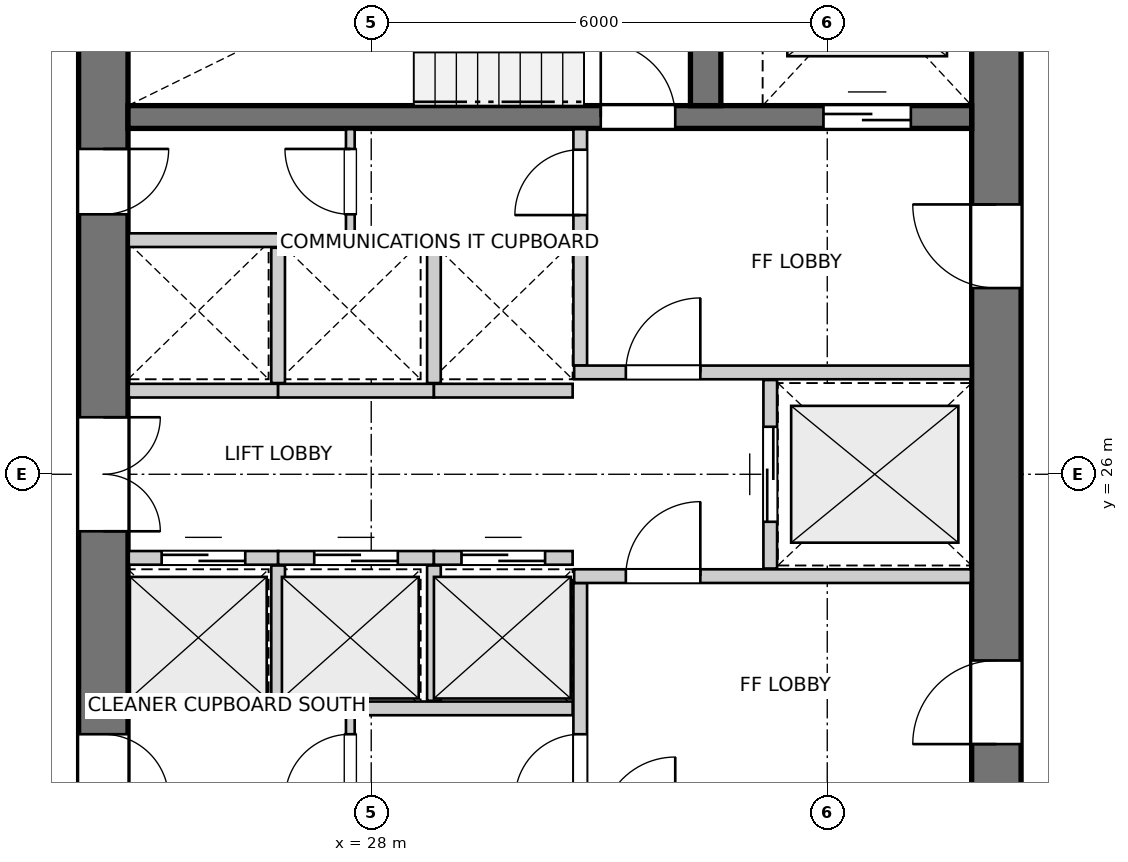
"""IFC4 building model, lengths in metres.
Left out: names, types, materials, properties, quantities, classifications, styles, units other than length and angle.
Written with IfcOpenShell. Run it as: python <this file> out.ifc"""

import sys

from ifc_helpers import new_model, si_unit, direction, frame, frame_2d, origin, place, context, subcontext, project, spatial, rectangle, extrude, source, transform, mapped, element, fill, save


model = new_model("IFC4")
c1 = context("Model", 3, precision=1e-05, world=origin(), true_north=direction((0.0, 1.0)))
c2 = subcontext(c1, "Body", "Model", "MODEL_VIEW")
j1 = project(units=[si_unit("LENGTHUNIT", "METRE"), si_unit("PLANEANGLEUNIT", "RADIAN")], contexts=[c1])
p1 = place(None, origin())
s1 = spatial("IfcSite", under=j1, at=p1, CompositionType="ELEMENT")
p2 = place(p1, origin())
s2 = spatial("IfcBuilding", under=s1, at=p2, CompositionType="ELEMENT")
p3 = place(p2, frame((0.0, 0.0, 108.8)))
s3 = spatial("IfcBuildingStorey", under=s2, at=p3, CompositionType="ELEMENT", Elevation=108.8)
p4 = place(p3, frame((24.475, 33.8, 0.0), z_axis=(0.0, 0.0, 1.0), x_axis=(0.0, -1.0, 0.0)))
e1 = element("IfcWall", 1, at=p4, inside=s3, PredefinedType="SHEAR", context=c2, shape_type="SweptSolid", body=[
    extrude(rectangle(XDim=15.6, YDim=0.65, at=frame_2d((7.8, 0.0))), origin(), (0.0, 0.0, 1.0), 2.935),
])
p5 = place(p4, frame((7.05, 0.0, 0.0)))
e2 = element("IfcOpeningElement", 2, at=p5, cuts=e1, PredefinedType="OPENING", context=c2, shape_type="SweptSolid", body=[
    extrude(rectangle(XDim=1.5, YDim=2.15, at=frame_2d((0.75, 1.075))), frame((0.0, 0.335, 0.0), z_axis=(0.0, -1.0, 0.0), x_axis=(1.0, 0.0, 0.0)), (0.0, 0.0, 1.0), 0.67),
])
p6 = place(p4, frame((3.52, 0.0, 0.0)))
e3 = element("IfcOpeningElement", 3, at=p6, cuts=e1, PredefinedType="OPENING", context=c2, shape_type="SweptSolid", body=[
    extrude(rectangle(XDim=0.86, YDim=2.05, at=frame_2d((0.43, 1.025))), frame((0.0, 0.335, 0.0), z_axis=(0.0, -1.0, 0.0), x_axis=(1.0, 0.0, 0.0)), (0.0, 0.0, 1.0), 0.67),
])
p7 = place(p4, frame((11.22, 0.0, 0.0)))
e4 = element("IfcOpeningElement", 4, at=p7, cuts=e1, PredefinedType="OPENING", context=c2, shape_type="SweptSolid", body=[
    extrude(rectangle(XDim=0.86, YDim=2.05, at=frame_2d((0.43, 1.025))), frame((0.0, 0.335, 0.0), z_axis=(0.0, -1.0, 0.0), x_axis=(1.0, 0.0, 0.0)), (0.0, 0.0, 1.0), 0.67),
])
p8 = place(p3, frame((36.225, 18.2, 0.0), z_axis=(0.0, 0.0, 1.0), x_axis=(0.0, 1.0, 0.0)))
e5 = element("IfcWall", 5, at=p8, inside=s3, PredefinedType="SHEAR", context=c2, shape_type="SweptSolid", body=[
    extrude(rectangle(XDim=15.6, YDim=0.65, at=frame_2d((7.8, 0.0))), origin(), (0.0, 0.0, 1.0), 2.935),
])
p9 = place(p8, frame((4.25, 0.0, 0.0)))
e6 = element("IfcOpeningElement", 6, at=p9, cuts=e5, PredefinedType="OPENING", context=c2, shape_type="SweptSolid", body=[
    extrude(rectangle(XDim=1.1, YDim=2.15, at=frame_2d((0.55, 1.075))), frame((0.0, 0.335, 0.0), z_axis=(0.0, -1.0, 0.0), x_axis=(1.0, 0.0, 0.0)), (0.0, 0.0, 1.0), 0.67),
])
p10 = place(p8, frame((10.25, 0.0, 0.0)))
e7 = element("IfcOpeningElement", 7, at=p10, cuts=e5, PredefinedType="OPENING", context=c2, shape_type="SweptSolid", body=[
    extrude(rectangle(XDim=1.1, YDim=2.15, at=frame_2d((0.55, 1.075))), frame((0.0, 0.335, 0.0), z_axis=(0.0, -1.0, 0.0), x_axis=(1.0, 0.0, 0.0)), (0.0, 0.0, 1.0), 0.67),
])
p11 = place(p3, frame((24.8, 30.7, 0.0), z_axis=(0.0, 0.0, 1.0), x_axis=(1.0, 0.0, 0.0)))
e8 = element("IfcWall", 8, at=p11, inside=s3, PredefinedType="SHEAR", context=c2, shape_type="SweptSolid", body=[
    extrude(rectangle(XDim=11.1, YDim=0.3, at=frame_2d((5.55, 0.0))), origin(), (0.0, 0.0, 1.0), 2.935),
])
p12 = place(p11, frame((6.22, 0.0, 0.0)))
e9 = element("IfcOpeningElement", 9, at=p12, cuts=e8, PredefinedType="OPENING", context=c2, shape_type="SweptSolid", body=[
    extrude(rectangle(XDim=0.98, YDim=2.15, at=frame_2d((0.49, 1.075))), frame((0.0, 0.16, 0.0), z_axis=(0.0, -1.0, 0.0), x_axis=(1.0, 0.0, 0.0)), (0.0, 0.0, 1.0), 0.32),
])
p13 = place(p11, frame((9.15, 0.0, 0.0)))
e10 = element("IfcOpeningElement", 10, at=p13, cuts=e8, PredefinedType="OPENING", context=c2, shape_type="SweptSolid", body=[
    extrude(rectangle(XDim=1.15, YDim=2.15, at=frame_2d((0.575, 1.075))), frame((0.0, 0.16, 0.0), z_axis=(0.0, -1.0, 0.0), x_axis=(1.0, 0.0, 0.0)), (0.0, 0.0, 1.0), 0.32),
])
p14 = place(p3, frame((32.4, 30.85, 0.0), z_axis=(0.0, 0.0, 1.0), x_axis=(0.0, 1.0, 0.0)))
e11 = element("IfcWall", 11, at=p14, inside=s3, PredefinedType="SHEAR", context=c2, shape_type="SweptSolid", body=[
    extrude(rectangle(XDim=2.95, YDim=0.4, at=frame_2d((1.475, 0.0))), origin(), (0.0, 0.0, 1.0), 2.935),
])
p15 = place(p3, frame((30.75, 21.46, 0.0), z_axis=(0.0, 0.0, 1.0), x_axis=(0.0, 1.0, 0.0)))
e12 = element("IfcWall", 12, at=p15, inside=s3, PredefinedType="PARTITIONING", context=c2, shape_type="SweptSolid", body=[
    extrude(rectangle(XDim=3.11, YDim=0.18, at=frame_2d((1.555, 0.0))), origin(), (0.0, 0.0, 1.0), 2.935),
])
p16 = place(p15, frame((0.26, 0.0, 0.0)))
e13 = element("IfcOpeningElement", 13, at=p16, cuts=e12, PredefinedType="OPENING", context=c2, shape_type="SweptSolid", body=[
    extrude(rectangle(XDim=0.86, YDim=2.05, at=frame_2d((0.43, 1.025))), frame((0.0, 0.1, 0.0), z_axis=(0.0, -1.0, 0.0), x_axis=(1.0, 0.0, 0.0)), (0.0, 0.0, 1.0), 0.2),
])
p17 = place(p3, frame((30.67, 24.66, 0.0), z_axis=(0.0, 0.0, 1.0), x_axis=(1.0, 0.0, 0.0)))
e14 = element("IfcWall", 14, at=p17, inside=s3, PredefinedType="PARTITIONING", context=c2, shape_type="SweptSolid", body=[
    extrude(rectangle(XDim=5.22, YDim=0.18, at=frame_2d((2.61, 0.0))), origin(), (0.0, 0.0, 1.0), 2.935),
])
p18 = place(p17, frame((0.68, 0.0, 0.0)))
e15 = element("IfcOpeningElement", 15, at=p18, cuts=e14, PredefinedType="OPENING", context=c2, shape_type="SweptSolid", body=[
    extrude(rectangle(XDim=0.98, YDim=2.15, at=frame_2d((0.49, 1.075))), frame((0.0, 0.1, 0.0), z_axis=(0.0, -1.0, 0.0), x_axis=(1.0, 0.0, 0.0)), (0.0, 0.0, 1.0), 0.2),
])
p19 = place(p3, frame((30.75, 27.43, 0.0), z_axis=(0.0, 0.0, 1.0), x_axis=(0.0, 1.0, 0.0)))
e16 = element("IfcWall", 16, at=p19, inside=s3, PredefinedType="PARTITIONING", context=c2, shape_type="SweptSolid", body=[
    extrude(rectangle(XDim=3.11, YDim=0.18, at=frame_2d((1.555, 0.0))), origin(), (0.0, 0.0, 1.0), 2.935),
])
p20 = place(p19, frame((1.98, 0.0, 0.0)))
e17 = element("IfcOpeningElement", 17, at=p20, cuts=e16, PredefinedType="OPENING", context=c2, shape_type="SweptSolid", body=[
    extrude(rectangle(XDim=0.86, YDim=2.05, at=frame_2d((0.43, 1.025))), frame((0.0, 0.1, 0.0), z_axis=(0.0, -1.0, 0.0), x_axis=(1.0, 0.0, 0.0)), (0.0, 0.0, 1.0), 0.2),
])
p21 = place(p3, frame((30.67, 27.34, 0.0), z_axis=(0.0, 0.0, 1.0), x_axis=(1.0, 0.0, 0.0)))
e18 = element("IfcWall", 18, at=p21, inside=s3, PredefinedType="PARTITIONING", context=c2, shape_type="SweptSolid", body=[
    extrude(rectangle(XDim=5.22, YDim=0.18, at=frame_2d((2.61, 0.0))), origin(), (0.0, 0.0, 1.0), 2.935),
])
p22 = place(p21, frame((0.68, 0.0, 0.0)))
e19 = element("IfcOpeningElement", 19, at=p22, cuts=e18, PredefinedType="OPENING", context=c2, shape_type="SweptSolid", body=[
    extrude(rectangle(XDim=0.98, YDim=2.15, at=frame_2d((0.49, 1.075))), frame((0.0, 0.1, 0.0), z_axis=(0.0, -1.0, 0.0), x_axis=(1.0, 0.0, 0.0)), (0.0, 0.0, 1.0), 0.2),
])
p23 = place(p3, frame((33.25, 24.76, 0.0), z_axis=(0.0, 0.0, 1.0), x_axis=(0.0, 1.0, 0.0)))
e20 = element("IfcWall", 20, at=p23, inside=s3, PredefinedType="PARTITIONING", context=c2, shape_type="SweptSolid", body=[
    extrude(rectangle(XDim=2.48, YDim=0.18, at=frame_2d((1.24, 0.0))), origin(), (0.0, 0.0, 1.0), 2.935),
])
p24 = place(p23, frame((0.615, 0.0, 0.0)))
e21 = element("IfcOpeningElement", 21, at=p24, cuts=e20, PredefinedType="OPENING", context=c2, shape_type="SweptSolid", body=[
    extrude(rectangle(XDim=1.25, YDim=2.15, at=frame_2d((0.625, 1.075))), frame((0.0, 0.1, 0.0), z_axis=(0.0, -1.0, 0.0), x_axis=(1.0, 0.0, 0.0)), (0.0, 0.0, 1.0), 0.2),
])
p25 = place(p3, frame((24.81, 22.92, 0.0), z_axis=(0.0, 0.0, 1.0), x_axis=(1.0, 0.0, 0.0)))
e22 = element("IfcWall", 22, at=p25, inside=s3, PredefinedType="PARTITIONING", context=c2, shape_type="SweptSolid", body=[
    extrude(rectangle(XDim=5.84, YDim=0.18, at=frame_2d((2.92, 0.0))), origin(), (0.0, 0.0, 1.0), 2.935),
])
p26 = place(p3, frame((24.81, 24.9, 0.0), z_axis=(0.0, 0.0, 1.0), x_axis=(1.0, 0.0, 0.0)))
e23 = element("IfcWall", 23, at=p26, inside=s3, PredefinedType="PARTITIONING", context=c2, shape_type="SweptSolid", body=[
    extrude(rectangle(XDim=1.965, YDim=0.18, at=frame_2d((0.982, 0.0))), origin(), (0.0, 0.0, 1.0), 2.935),
])
p27 = place(p26, frame((0.433, 0.0, 0.0)))
e24 = element("IfcOpeningElement", 24, at=p27, cuts=e23, PredefinedType="OPENING", context=c2, shape_type="SweptSolid", body=[
    extrude(rectangle(XDim=1.1, YDim=2.15, at=frame_2d((0.55, 1.075))), frame((0.0, 0.1, 0.0), z_axis=(0.0, -1.0, 0.0), x_axis=(1.0, 0.0, 0.0)), (0.0, 0.0, 1.0), 0.2),
])
p28 = place(p3, frame((26.775, 24.9, 0.0), z_axis=(0.0, 0.0, 1.0), x_axis=(1.0, 0.0, 0.0)))
e25 = element("IfcWall", 25, at=p28, inside=s3, PredefinedType="PARTITIONING", context=c2, shape_type="SweptSolid", body=[
    extrude(rectangle(XDim=2.05, YDim=0.18, at=frame_2d((1.025, 0.0))), origin(), (0.0, 0.0, 1.0), 2.935),
])
p29 = place(p28, frame((0.475, 0.0, 0.0)))
e26 = element("IfcOpeningElement", 26, at=p29, cuts=e25, PredefinedType="OPENING", context=c2, shape_type="SweptSolid", body=[
    extrude(rectangle(XDim=1.1, YDim=2.15, at=frame_2d((0.55, 1.075))), frame((0.0, 0.1, 0.0), z_axis=(0.0, -1.0, 0.0), x_axis=(1.0, 0.0, 0.0)), (0.0, 0.0, 1.0), 0.2),
])
p30 = place(p3, frame((26.775, 23.02, 0.0), z_axis=(0.0, 0.0, 1.0), x_axis=(0.0, 1.0, 0.0)))
e27 = element("IfcWall", 27, at=p30, inside=s3, PredefinedType="PARTITIONING", context=c2, shape_type="SweptSolid", body=[
    extrude(rectangle(XDim=1.78, YDim=0.18, at=frame_2d((0.89, 0.0))), origin(), (0.0, 0.0, 1.0), 2.935),
])
p31 = place(p3, frame((28.825, 24.9, 0.0), z_axis=(0.0, 0.0, 1.0), x_axis=(1.0, 0.0, 0.0)))
e28 = element("IfcWall", 28, at=p31, inside=s3, PredefinedType="PARTITIONING", context=c2, shape_type="SweptSolid", body=[
    extrude(rectangle(XDim=1.825, YDim=0.18, at=frame_2d((0.913, 0.0))), origin(), (0.0, 0.0, 1.0), 2.935),
])
p32 = place(p31, frame((0.363, 0.0, 0.0)))
e29 = element("IfcOpeningElement", 29, at=p32, cuts=e28, PredefinedType="OPENING", context=c2, shape_type="SweptSolid", body=[
    extrude(rectangle(XDim=1.1, YDim=2.15, at=frame_2d((0.55, 1.075))), frame((0.0, 0.1, 0.0), z_axis=(0.0, -1.0, 0.0), x_axis=(1.0, 0.0, 0.0)), (0.0, 0.0, 1.0), 0.2),
])
p33 = place(p3, frame((28.825, 23.02, 0.0), z_axis=(0.0, 0.0, 1.0), x_axis=(0.0, 1.0, 0.0)))
e30 = element("IfcWall", 30, at=p33, inside=s3, PredefinedType="PARTITIONING", context=c2, shape_type="SweptSolid", body=[
    extrude(rectangle(XDim=1.78, YDim=0.18, at=frame_2d((0.89, 0.0))), origin(), (0.0, 0.0, 1.0), 2.935),
])
p34 = place(p3, frame((24.81, 29.08, 0.0), z_axis=(0.0, 0.0, 1.0), x_axis=(1.0, 0.0, 0.0)))
e31 = element("IfcWall", 31, at=p34, inside=s3, PredefinedType="PARTITIONING", context=c2, shape_type="SweptSolid", body=[
    extrude(rectangle(XDim=5.84, YDim=0.18, at=frame_2d((2.92, 0.0))), origin(), (0.0, 0.0, 1.0), 2.935),
])
p35 = place(p3, frame((24.81, 27.1, 0.0), z_axis=(0.0, 0.0, 1.0), x_axis=(1.0, 0.0, 0.0)))
e32 = element("IfcWall", 32, at=p35, inside=s3, PredefinedType="PARTITIONING", context=c2, shape_type="SweptSolid", body=[
    extrude(rectangle(XDim=1.965, YDim=0.18, at=frame_2d((0.982, 0.0))), origin(), (0.0, 0.0, 1.0), 2.935),
])
p36 = place(p3, frame((26.775, 27.1, 0.0), z_axis=(0.0, 0.0, 1.0), x_axis=(1.0, 0.0, 0.0)))
e33 = element("IfcWall", 33, at=p36, inside=s3, PredefinedType="PARTITIONING", context=c2, shape_type="SweptSolid", body=[
    extrude(rectangle(XDim=2.05, YDim=0.18, at=frame_2d((1.025, 0.0))), origin(), (0.0, 0.0, 1.0), 2.935),
])
p37 = place(p3, frame((26.775, 27.2, 0.0), z_axis=(0.0, 0.0, 1.0), x_axis=(0.0, 1.0, 0.0)))
e34 = element("IfcWall", 34, at=p37, inside=s3, PredefinedType="PARTITIONING", context=c2, shape_type="SweptSolid", body=[
    extrude(rectangle(XDim=1.78, YDim=0.18, at=frame_2d((0.89, 0.0))), origin(), (0.0, 0.0, 1.0), 2.935),
])
p38 = place(p3, frame((28.825, 27.1, 0.0), z_axis=(0.0, 0.0, 1.0), x_axis=(1.0, 0.0, 0.0)))
e35 = element("IfcWall", 35, at=p38, inside=s3, PredefinedType="PARTITIONING", context=c2, shape_type="SweptSolid", body=[
    extrude(rectangle(XDim=1.825, YDim=0.18, at=frame_2d((0.913, 0.0))), origin(), (0.0, 0.0, 1.0), 2.935),
])
p39 = place(p3, frame((28.825, 27.2, 0.0), z_axis=(0.0, 0.0, 1.0), x_axis=(0.0, 1.0, 0.0)))
e36 = element("IfcWall", 36, at=p39, inside=s3, PredefinedType="PARTITIONING", context=c2, shape_type="SweptSolid", body=[
    extrude(rectangle(XDim=1.78, YDim=0.18, at=frame_2d((0.89, 0.0))), origin(), (0.0, 0.0, 1.0), 2.935),
])
p40 = place(p3, frame((27.725, 21.46, 0.0), z_axis=(0.0, 0.0, 1.0), x_axis=(0.0, 1.0, 0.0)))
e37 = element("IfcWall", 37, at=p40, inside=s3, PredefinedType="PARTITIONING", context=c2, shape_type="SweptSolid", body=[
    extrude(rectangle(XDim=1.38, YDim=0.115, at=frame_2d((0.69, 0.0))), origin(), (0.0, 0.0, 1.0), 2.935),
])
p41 = place(p40, frame((0.26, 0.0, 0.0)))
e38 = element("IfcOpeningElement", 38, at=p41, cuts=e37, PredefinedType="OPENING", context=c2, shape_type="SweptSolid", body=[
    extrude(rectangle(XDim=0.86, YDim=2.05, at=frame_2d((0.43, 1.025))), frame((0.0, 0.067, 0.0), z_axis=(0.0, -1.0, 0.0), x_axis=(1.0, 0.0, 0.0)), (0.0, 0.0, 1.0), 0.135),
])
p42 = place(p3, frame((27.725, 29.16, 0.0), z_axis=(0.0, 0.0, 1.0), x_axis=(0.0, 1.0, 0.0)))
e39 = element("IfcWall", 39, at=p42, inside=s3, PredefinedType="PARTITIONING", context=c2, shape_type="SweptSolid", body=[
    extrude(rectangle(XDim=1.38, YDim=0.115, at=frame_2d((0.69, 0.0))), origin(), (0.0, 0.0, 1.0), 2.935),
])
p43 = place(p42, frame((0.26, 0.0, 0.0)))
e40 = element("IfcOpeningElement", 40, at=p43, cuts=e39, PredefinedType="OPENING", context=c2, shape_type="SweptSolid", body=[
    extrude(rectangle(XDim=0.86, YDim=2.05, at=frame_2d((0.43, 1.025))), frame((0.0, 0.067, 0.0), z_axis=(0.0, -1.0, 0.0), x_axis=(1.0, 0.0, 0.0)), (0.0, 0.0, 1.0), 0.135),
])
m1 = source(origin(), c2, "Body", "SweptSolid", [
    extrude(rectangle(XDim=0.98, YDim=2.15, at=frame_2d((0.49, 1.075))), frame((0.0, 0.025, 0.0), z_axis=(0.0, -1.0, 0.0), x_axis=(1.0, 0.0, 0.0)), (0.0, 0.0, 1.0), 0.05),
])
p44 = place(p12, origin())
e41 = element("IfcDoor", 41, at=p44, inside=s3, OperationType="SINGLE_SWING_LEFT", PredefinedType="DOOR", context=c2, shape_type="MappedRepresentation", body=[
    mapped(m1, transform((0.0, 0.0, 0.0), x_axis=(1.0, 0.0, 0.0), y_axis=(0.0, 1.0, 0.0), z_axis=(0.0, 0.0, 1.0), scale=1.0)),
])
fill(e9, e41)
m2 = source(origin(), c2, "Body", "SweptSolid", [
    extrude(rectangle(XDim=1.15, YDim=2.15, at=frame_2d((0.575, 1.075))), frame((0.0, 0.025, 0.0), z_axis=(0.0, -1.0, 0.0), x_axis=(1.0, 0.0, 0.0)), (0.0, 0.0, 1.0), 0.05),
])
p45 = place(p13, origin())
e42 = element("IfcDoor", 42, at=p45, inside=s3, OperationType="DOUBLE_DOOR_SLIDING", PredefinedType="DOOR", context=c2, shape_type="MappedRepresentation", body=[
    mapped(m2, transform((0.0, 0.0, 0.0), x_axis=(1.0, 0.0, 0.0), y_axis=(0.0, 1.0, 0.0), z_axis=(0.0, 0.0, 1.0), scale=1.0)),
])
fill(e10, e42)
m3 = source(origin(), c2, "Body", "SweptSolid", [
    extrude(rectangle(XDim=1.1, YDim=2.15, at=frame_2d((0.55, 1.075))), frame((0.0, 0.025, 0.0), z_axis=(0.0, -1.0, 0.0), x_axis=(1.0, 0.0, 0.0)), (0.0, 0.0, 1.0), 0.05),
])
p46 = place(p9, origin())
e43 = element("IfcDoor", 43, at=p46, inside=s3, OperationType="SINGLE_SWING_LEFT", PredefinedType="DOOR", context=c2, shape_type="MappedRepresentation", body=[
    mapped(m3, transform((0.0, 0.0, 0.0), x_axis=(1.0, 0.0, 0.0), y_axis=(0.0, 1.0, 0.0), z_axis=(0.0, 0.0, 1.0), scale=1.0)),
])
fill(e6, e43)
p47 = place(p10, origin())
e44 = element("IfcDoor", 44, at=p47, inside=s3, OperationType="SINGLE_SWING_RIGHT", PredefinedType="DOOR", context=c2, shape_type="MappedRepresentation", body=[
    mapped(m3, transform((0.0, 0.0, 0.0), x_axis=(1.0, 0.0, 0.0), y_axis=(0.0, 1.0, 0.0), z_axis=(0.0, 0.0, 1.0), scale=1.0)),
])
fill(e7, e44)
m4 = source(origin(), c2, "Body", "SweptSolid", [
    extrude(rectangle(XDim=1.5, YDim=2.15, at=frame_2d((0.75, 1.075))), frame((0.0, 0.025, 0.0), z_axis=(0.0, -1.0, 0.0), x_axis=(1.0, 0.0, 0.0)), (0.0, 0.0, 1.0), 0.05),
])
p48 = place(p5, origin())
e45 = element("IfcDoor", 45, at=p48, inside=s3, OperationType="DOUBLE_DOOR_SINGLE_SWING", PredefinedType="DOOR", context=c2, shape_type="MappedRepresentation", body=[
    mapped(m4, transform((0.0, 0.0, 0.0), x_axis=(1.0, 0.0, 0.0), y_axis=(0.0, 1.0, 0.0), z_axis=(0.0, 0.0, 1.0), scale=1.0)),
])
fill(e2, e45)
m5 = source(origin(), c2, "Body", "SweptSolid", [
    extrude(rectangle(XDim=0.86, YDim=2.05, at=frame_2d((0.43, 1.025))), frame((0.0, 0.025, 0.0), z_axis=(0.0, -1.0, 0.0), x_axis=(1.0, 0.0, 0.0)), (0.0, 0.0, 1.0), 0.05),
])
p49 = place(p6, origin())
e46 = element("IfcDoor", 46, at=p49, inside=s3, OperationType="SINGLE_SWING_LEFT", PredefinedType="DOOR", context=c2, shape_type="MappedRepresentation", body=[
    mapped(m5, transform((0.0, 0.0, 0.0), x_axis=(1.0, 0.0, 0.0), y_axis=(0.0, 1.0, 0.0), z_axis=(0.0, 0.0, 1.0), scale=1.0)),
])
fill(e3, e46)
p50 = place(p7, origin())
e47 = element("IfcDoor", 47, at=p50, inside=s3, OperationType="SINGLE_SWING_RIGHT", PredefinedType="DOOR", context=c2, shape_type="MappedRepresentation", body=[
    mapped(m5, transform((0.0, 0.0, 0.0), x_axis=(1.0, 0.0, 0.0), y_axis=(0.0, 1.0, 0.0), z_axis=(0.0, 0.0, 1.0), scale=1.0)),
])
fill(e4, e47)
p51 = place(p16, origin())
e48 = element("IfcDoor", 48, at=p51, inside=s3, OperationType="SINGLE_SWING_LEFT", PredefinedType="DOOR", context=c2, shape_type="MappedRepresentation", body=[
    mapped(m5, transform((0.0, 0.0, 0.0), x_axis=(1.0, 0.0, 0.0), y_axis=(0.0, 1.0, 0.0), z_axis=(0.0, 0.0, 1.0), scale=1.0)),
])
fill(e13, e48)
p52 = place(p18, origin())
e49 = element("IfcDoor", 49, at=p52, inside=s3, OperationType="SINGLE_SWING_RIGHT", PredefinedType="DOOR", context=c2, shape_type="MappedRepresentation", body=[
    mapped(m1, transform((0.0, 0.0, 0.0), x_axis=(1.0, 0.0, 0.0), y_axis=(0.0, 1.0, 0.0), z_axis=(0.0, 0.0, 1.0), scale=1.0)),
])
fill(e15, e49)
p53 = place(p20, origin())
e50 = element("IfcDoor", 50, at=p53, inside=s3, OperationType="SINGLE_SWING_LEFT", PredefinedType="DOOR", context=c2, shape_type="MappedRepresentation", body=[
    mapped(m5, transform((0.0, 0.0, 0.0), x_axis=(1.0, 0.0, 0.0), y_axis=(0.0, 1.0, 0.0), z_axis=(0.0, 0.0, 1.0), scale=1.0)),
])
fill(e17, e50)
p54 = place(p22, origin())
e51 = element("IfcDoor", 51, at=p54, inside=s3, OperationType="SINGLE_SWING_RIGHT", PredefinedType="DOOR", context=c2, shape_type="MappedRepresentation", body=[
    mapped(m1, transform((0.0, 0.0, 0.0), x_axis=(1.0, 0.0, 0.0), y_axis=(0.0, 1.0, 0.0), z_axis=(0.0, 0.0, 1.0), scale=1.0)),
])
fill(e19, e51)
m6 = source(origin(), c2, "Body", "SweptSolid", [
    extrude(rectangle(XDim=1.25, YDim=2.15, at=frame_2d((0.625, 1.075))), frame((0.0, 0.025, 0.0), z_axis=(0.0, -1.0, 0.0), x_axis=(1.0, 0.0, 0.0)), (0.0, 0.0, 1.0), 0.05),
])
p55 = place(p24, origin())
e52 = element("IfcDoor", 52, at=p55, inside=s3, OperationType="DOUBLE_DOOR_SLIDING", PredefinedType="DOOR", context=c2, shape_type="MappedRepresentation", body=[
    mapped(m6, transform((0.0, 0.0, 0.0), x_axis=(1.0, 0.0, 0.0), y_axis=(0.0, 1.0, 0.0), z_axis=(0.0, 0.0, 1.0), scale=1.0)),
])
fill(e21, e52)
p56 = place(p27, origin())
e53 = element("IfcDoor", 53, at=p56, inside=s3, OperationType="DOUBLE_DOOR_SLIDING", PredefinedType="DOOR", context=c2, shape_type="MappedRepresentation", body=[
    mapped(m3, transform((0.0, 0.0, 0.0), x_axis=(1.0, 0.0, 0.0), y_axis=(0.0, 1.0, 0.0), z_axis=(0.0, 0.0, 1.0), scale=1.0)),
])
fill(e24, e53)
p57 = place(p29, origin())
e54 = element("IfcDoor", 54, at=p57, inside=s3, OperationType="DOUBLE_DOOR_SLIDING", PredefinedType="DOOR", context=c2, shape_type="MappedRepresentation", body=[
    mapped(m3, transform((0.0, 0.0, 0.0), x_axis=(1.0, 0.0, 0.0), y_axis=(0.0, 1.0, 0.0), z_axis=(0.0, 0.0, 1.0), scale=1.0)),
])
fill(e26, e54)
p58 = place(p32, origin())
e55 = element("IfcDoor", 55, at=p58, inside=s3, OperationType="DOUBLE_DOOR_SLIDING", PredefinedType="DOOR", context=c2, shape_type="MappedRepresentation", body=[
    mapped(m3, transform((0.0, 0.0, 0.0), x_axis=(1.0, 0.0, 0.0), y_axis=(0.0, 1.0, 0.0), z_axis=(0.0, 0.0, 1.0), scale=1.0)),
])
fill(e29, e55)
p59 = place(p41, origin())
e56 = element("IfcDoor", 56, at=p59, inside=s3, OperationType="SINGLE_SWING_LEFT", PredefinedType="DOOR", context=c2, shape_type="MappedRepresentation", body=[
    mapped(m5, transform((0.0, 0.0, 0.0), x_axis=(1.0, 0.0, 0.0), y_axis=(0.0, 1.0, 0.0), z_axis=(0.0, 0.0, 1.0), scale=1.0)),
])
fill(e38, e56)
p60 = place(p43, origin())
e57 = element("IfcDoor", 57, at=p60, inside=s3, OperationType="SINGLE_SWING_RIGHT", PredefinedType="DOOR", context=c2, shape_type="MappedRepresentation", body=[
    mapped(m5, transform((0.0, 0.0, 0.0), x_axis=(1.0, 0.0, 0.0), y_axis=(0.0, 1.0, 0.0), z_axis=(0.0, 0.0, 1.0), scale=1.0)),
])
fill(e40, e57)
save(model, sys.argv[1])
